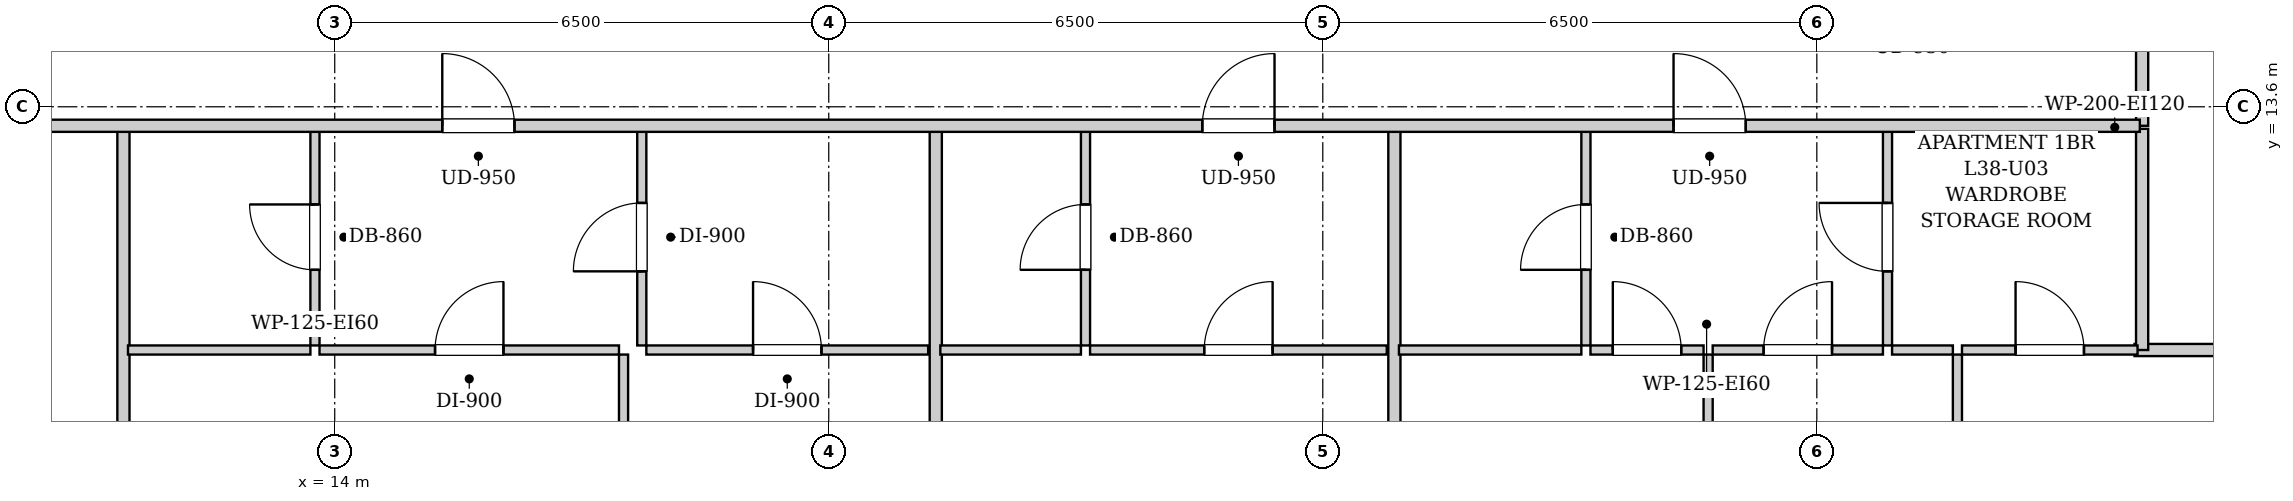
"""IFC4 building model, lengths in metres.
Left out: names, types, materials, properties, quantities, classifications, styles, units other than length and angle.
Written with IfcOpenShell. Run it as: python <this file> out.ifc"""

import sys

from ifc_helpers import new_model, si_unit, direction, frame, frame_2d, origin, place, context, subcontext, project, spatial, rectangle, extrude, element, fill, save


model = new_model("IFC4")
c1 = context("Model", 3, precision=1e-05, world=origin(), true_north=direction((0.0, 1.0)))
c2 = subcontext(c1, "Body", "Model", "MODEL_VIEW")
j1 = project(units=[si_unit("LENGTHUNIT", "METRE"), si_unit("PLANEANGLEUNIT", "RADIAN")], contexts=[c1])
p1 = place(None, origin())
s1 = spatial("IfcSite", under=j1, at=p1, CompositionType="ELEMENT")
p2 = place(p1, origin())
s2 = spatial("IfcBuilding", under=s1, at=p2, CompositionType="ELEMENT")
p3 = place(p2, frame((0.0, 0.0, 134.15)))
s3 = spatial("IfcBuildingStorey", under=s2, at=p3, CompositionType="ELEMENT", Elevation=134.15)
p4 = place(p3, frame((37.78, 13.35, 0.0), z_axis=(0.0, 0.0, 1.0), x_axis=(0.0, 1.0, 0.0)))
e1 = element("IfcWall", 1, at=p4, inside=s3, PredefinedType="PARTITIONING", context=c2, shape_type="SweptSolid", body=[
    extrude(rectangle(XDim=1.74, YDim=0.16, at=frame_2d((0.87, 0.0))), origin(), (0.0, 0.0, 1.0), 2.99),
])
p5 = place(p3, frame((11.22, 4.08, 0.0), z_axis=(0.0, 0.0, 1.0), x_axis=(0.0, 1.0, 0.0)))
e2 = element("IfcWall", 2, at=p5, inside=s3, PredefinedType="PARTITIONING", context=c2, shape_type="SweptSolid", body=[
    extrude(rectangle(XDim=9.23, YDim=0.16, at=frame_2d((4.615, 0.0))), origin(), (0.0, 0.0, 1.0), 2.99),
])
p6 = place(p3, frame((13.74, 10.46, 0.0), z_axis=(0.0, 0.0, 1.0), x_axis=(0.0, 1.0, 0.0)))
e3 = element("IfcWall", 3, at=p6, inside=s3, PredefinedType="PARTITIONING", context=c2, shape_type="SweptSolid", body=[
    extrude(rectangle(XDim=2.85, YDim=0.12, at=frame_2d((1.425, 0.0))), origin(), (0.0, 0.0, 1.0), 2.99),
])
p7 = place(p6, frame((0.995, 0.0, 0.0)))
e4 = element("IfcOpeningElement", 4, at=p7, cuts=e3, PredefinedType="OPENING", context=c2, shape_type="SweptSolid", body=[
    extrude(rectangle(XDim=0.86, YDim=2.05, at=frame_2d((0.43, 1.025))), frame((0.0, 0.07, 0.0), z_axis=(0.0, -1.0, 0.0), x_axis=(1.0, 0.0, 0.0)), (0.0, 0.0, 1.0), 0.14),
])
p8 = place(p3, frame((11.28, 10.4, 0.0), z_axis=(0.0, 0.0, 1.0), x_axis=(1.0, 0.0, 0.0)))
e5 = element("IfcWall", 5, at=p8, inside=s3, PredefinedType="PARTITIONING", context=c2, shape_type="SweptSolid", body=[
    extrude(rectangle(XDim=2.4, YDim=0.12, at=frame_2d((1.2, 0.0))), origin(), (0.0, 0.0, 1.0), 2.99),
])
p9 = place(p3, frame((18.04, 10.46, 0.0), z_axis=(0.0, 0.0, 1.0), x_axis=(0.0, 1.0, 0.0)))
e6 = element("IfcWall", 6, at=p9, inside=s3, PredefinedType="PARTITIONING", context=c2, shape_type="SweptSolid", body=[
    extrude(rectangle(XDim=2.85, YDim=0.12, at=frame_2d((1.425, 0.0))), origin(), (0.0, 0.0, 1.0), 2.99),
])
p10 = place(p9, frame((0.975, 0.0, 0.0)))
e7 = element("IfcOpeningElement", 7, at=p10, cuts=e6, PredefinedType="OPENING", context=c2, shape_type="SweptSolid", body=[
    extrude(rectangle(XDim=0.9, YDim=2.05, at=frame_2d((0.45, 1.025))), frame((0.0, 0.07, 0.0), z_axis=(0.0, -1.0, 0.0), x_axis=(1.0, 0.0, 0.0)), (0.0, 0.0, 1.0), 0.14),
])
p11 = place(p3, frame((13.8, 10.4, 0.0), z_axis=(0.0, 0.0, 1.0), x_axis=(1.0, 0.0, 0.0)))
e8 = element("IfcWall", 8, at=p11, inside=s3, PredefinedType="PARTITIONING", context=c2, shape_type="SweptSolid", body=[
    extrude(rectangle(XDim=3.94, YDim=0.12, at=frame_2d((1.97, 0.0))), origin(), (0.0, 0.0, 1.0), 2.99),
])
p12 = place(p11, frame((1.52, 0.0, 0.0)))
e9 = element("IfcOpeningElement", 9, at=p12, cuts=e8, PredefinedType="OPENING", context=c2, shape_type="SweptSolid", body=[
    extrude(rectangle(XDim=0.9, YDim=2.05, at=frame_2d((0.45, 1.025))), frame((0.0, 0.07, 0.0), z_axis=(0.0, -1.0, 0.0), x_axis=(1.0, 0.0, 0.0)), (0.0, 0.0, 1.0), 0.14),
])
p13 = place(p3, frame((18.1, 10.4, 0.0), z_axis=(0.0, 0.0, 1.0), x_axis=(1.0, 0.0, 0.0)))
e10 = element("IfcWall", 10, at=p13, inside=s3, PredefinedType="PARTITIONING", context=c2, shape_type="SweptSolid", body=[
    extrude(rectangle(XDim=3.708, YDim=0.12, at=frame_2d((1.854, 0.0))), origin(), (0.0, 0.0, 1.0), 2.99),
])
p14 = place(p13, frame((1.404, 0.0, 0.0)))
e11 = element("IfcOpeningElement", 11, at=p14, cuts=e10, PredefinedType="OPENING", context=c2, shape_type="SweptSolid", body=[
    extrude(rectangle(XDim=0.9, YDim=2.05, at=frame_2d((0.45, 1.025))), frame((0.0, 0.07, 0.0), z_axis=(0.0, -1.0, 0.0), x_axis=(1.0, 0.0, 0.0)), (0.0, 0.0, 1.0), 0.14),
])
p15 = place(p3, frame((17.8, 4.08, 0.0), z_axis=(0.0, 0.0, 1.0), x_axis=(0.0, 1.0, 0.0)))
e12 = element("IfcWall", 12, at=p15, inside=s3, PredefinedType="PARTITIONING", context=c2, shape_type="SweptSolid", body=[
    extrude(rectangle(XDim=6.26, YDim=0.12, at=frame_2d((3.13, 0.0))), origin(), (0.0, 0.0, 1.0), 2.426),
])
p16 = place(p15, frame((2.665, 0.0, 0.0)))
e13 = element("IfcOpeningElement", 13, at=p16, cuts=e12, PredefinedType="OPENING", context=c2, shape_type="SweptSolid", body=[
    extrude(rectangle(XDim=0.9, YDim=2.05, at=frame_2d((0.45, 1.025))), frame((0.0, 0.07, 0.0), z_axis=(0.0, -1.0, 0.0), x_axis=(1.0, 0.0, 0.0)), (0.0, 0.0, 1.0), 0.14),
])
p17 = place(p3, frame((21.908, 4.08, 0.0), z_axis=(0.0, 0.0, 1.0), x_axis=(0.0, 1.0, 0.0)))
e14 = element("IfcWall", 14, at=p17, inside=s3, PredefinedType="PARTITIONING", context=c2, shape_type="SweptSolid", body=[
    extrude(rectangle(XDim=9.23, YDim=0.16, at=frame_2d((4.615, 0.0))), origin(), (0.0, 0.0, 1.0), 2.99),
])
p18 = place(p3, frame((23.878, 10.46, 0.0), z_axis=(0.0, 0.0, 1.0), x_axis=(0.0, 1.0, 0.0)))
e15 = element("IfcWall", 15, at=p18, inside=s3, PredefinedType="PARTITIONING", context=c2, shape_type="SweptSolid", body=[
    extrude(rectangle(XDim=2.85, YDim=0.12, at=frame_2d((1.425, 0.0))), origin(), (0.0, 0.0, 1.0), 2.99),
])
p19 = place(p18, frame((0.995, 0.0, 0.0)))
e16 = element("IfcOpeningElement", 16, at=p19, cuts=e15, PredefinedType="OPENING", context=c2, shape_type="SweptSolid", body=[
    extrude(rectangle(XDim=0.86, YDim=2.05, at=frame_2d((0.43, 1.025))), frame((0.0, 0.07, 0.0), z_axis=(0.0, -1.0, 0.0), x_axis=(1.0, 0.0, 0.0)), (0.0, 0.0, 1.0), 0.14),
])
p20 = place(p3, frame((21.968, 10.4, 0.0), z_axis=(0.0, 0.0, 1.0), x_axis=(1.0, 0.0, 0.0)))
e17 = element("IfcWall", 17, at=p20, inside=s3, PredefinedType="PARTITIONING", context=c2, shape_type="SweptSolid", body=[
    extrude(rectangle(XDim=1.85, YDim=0.12, at=frame_2d((0.925, 0.0))), origin(), (0.0, 0.0, 1.0), 2.99),
])
p21 = place(p3, frame((23.938, 10.4, 0.0), z_axis=(0.0, 0.0, 1.0), x_axis=(1.0, 0.0, 0.0)))
e18 = element("IfcWall", 18, at=p21, inside=s3, PredefinedType="PARTITIONING", context=c2, shape_type="SweptSolid", body=[
    extrude(rectangle(XDim=3.904, YDim=0.12, at=frame_2d((1.952, 0.0))), origin(), (0.0, 0.0, 1.0), 2.99),
])
p22 = place(p21, frame((1.502, 0.0, 0.0)))
e19 = element("IfcOpeningElement", 19, at=p22, cuts=e18, PredefinedType="OPENING", context=c2, shape_type="SweptSolid", body=[
    extrude(rectangle(XDim=0.9, YDim=2.05, at=frame_2d((0.45, 1.025))), frame((0.0, 0.07, 0.0), z_axis=(0.0, -1.0, 0.0), x_axis=(1.0, 0.0, 0.0)), (0.0, 0.0, 1.0), 0.14),
])
p23 = place(p3, frame((37.68, 10.4, 0.0), z_axis=(0.0, 0.0, 1.0), x_axis=(1.0, 0.0, 0.0)))
e20 = element("IfcWall", 20, at=p23, inside=s3, PredefinedType="PARTITIONING", context=c2, shape_type="SweptSolid", body=[
    extrude(rectangle(XDim=2.34, YDim=0.16, at=frame_2d((1.17, 0.0))), origin(), (0.0, 0.0, 1.0), 2.99),
])
p24 = place(p3, frame((37.78, 10.4, 0.0), z_axis=(0.0, 0.0, 1.0), x_axis=(0.0, 1.0, 0.0)))
e21 = element("IfcWall", 21, at=p24, inside=s3, PredefinedType="PARTITIONING", context=c2, shape_type="SweptSolid", body=[
    extrude(rectangle(XDim=2.91, YDim=0.16, at=frame_2d((1.455, 0.0))), origin(), (0.0, 0.0, 1.0), 2.99),
])
p25 = place(p3, frame((27.942, 4.08, 0.0), z_axis=(0.0, 0.0, 1.0), x_axis=(0.0, 1.0, 0.0)))
e22 = element("IfcWall", 22, at=p25, inside=s3, PredefinedType="PARTITIONING", context=c2, shape_type="SweptSolid", body=[
    extrude(rectangle(XDim=9.23, YDim=0.16, at=frame_2d((4.615, 0.0))), origin(), (0.0, 0.0, 1.0), 2.99),
])
p26 = place(p3, frame((30.462, 10.46, 0.0), z_axis=(0.0, 0.0, 1.0), x_axis=(0.0, 1.0, 0.0)))
e23 = element("IfcWall", 23, at=p26, inside=s3, PredefinedType="PARTITIONING", context=c2, shape_type="SweptSolid", body=[
    extrude(rectangle(XDim=2.85, YDim=0.12, at=frame_2d((1.425, 0.0))), origin(), (0.0, 0.0, 1.0), 2.99),
])
p27 = place(p26, frame((0.995, 0.0, 0.0)))
e24 = element("IfcOpeningElement", 24, at=p27, cuts=e23, PredefinedType="OPENING", context=c2, shape_type="SweptSolid", body=[
    extrude(rectangle(XDim=0.86, YDim=2.05, at=frame_2d((0.43, 1.025))), frame((0.0, 0.07, 0.0), z_axis=(0.0, -1.0, 0.0), x_axis=(1.0, 0.0, 0.0)), (0.0, 0.0, 1.0), 0.14),
])
p28 = place(p3, frame((28.002, 10.4, 0.0), z_axis=(0.0, 0.0, 1.0), x_axis=(1.0, 0.0, 0.0)))
e25 = element("IfcWall", 25, at=p28, inside=s3, PredefinedType="PARTITIONING", context=c2, shape_type="SweptSolid", body=[
    extrude(rectangle(XDim=2.4, YDim=0.12, at=frame_2d((1.2, 0.0))), origin(), (0.0, 0.0, 1.0), 2.99),
])
p29 = place(p3, frame((34.43, 10.46, 0.0), z_axis=(0.0, 0.0, 1.0), x_axis=(0.0, 1.0, 0.0)))
e26 = element("IfcWall", 26, at=p29, inside=s3, PredefinedType="PARTITIONING", context=c2, shape_type="SweptSolid", body=[
    extrude(rectangle(XDim=2.85, YDim=0.12, at=frame_2d((1.425, 0.0))), origin(), (0.0, 0.0, 1.0), 2.99),
])
p30 = place(p29, frame((0.975, 0.0, 0.0)))
e27 = element("IfcOpeningElement", 27, at=p30, cuts=e26, PredefinedType="OPENING", context=c2, shape_type="SweptSolid", body=[
    extrude(rectangle(XDim=0.9, YDim=2.05, at=frame_2d((0.45, 1.025))), frame((0.0, 0.07, 0.0), z_axis=(0.0, -1.0, 0.0), x_axis=(1.0, 0.0, 0.0)), (0.0, 0.0, 1.0), 0.14),
])
p31 = place(p3, frame((30.522, 10.4, 0.0), z_axis=(0.0, 0.0, 1.0), x_axis=(1.0, 0.0, 0.0)))
e28 = element("IfcWall", 28, at=p31, inside=s3, PredefinedType="PARTITIONING", context=c2, shape_type="SweptSolid", body=[
    extrude(rectangle(XDim=1.488, YDim=0.12, at=frame_2d((0.744, 0.0))), origin(), (0.0, 0.0, 1.0), 2.99),
])
p32 = place(p31, frame((0.294, 0.0, 0.0)))
e29 = element("IfcOpeningElement", 29, at=p32, cuts=e28, PredefinedType="OPENING", context=c2, shape_type="SweptSolid", body=[
    extrude(rectangle(XDim=0.9, YDim=2.05, at=frame_2d((0.45, 1.025))), frame((0.0, 0.07, 0.0), z_axis=(0.0, -1.0, 0.0), x_axis=(1.0, 0.0, 0.0)), (0.0, 0.0, 1.0), 0.14),
])
p33 = place(p3, frame((32.13, 10.4, 0.0), z_axis=(0.0, 0.0, 1.0), x_axis=(1.0, 0.0, 0.0)))
e30 = element("IfcWall", 30, at=p33, inside=s3, PredefinedType="PARTITIONING", context=c2, shape_type="SweptSolid", body=[
    extrude(rectangle(XDim=2.24, YDim=0.12, at=frame_2d((1.12, 0.0))), origin(), (0.0, 0.0, 1.0), 2.99),
])
p34 = place(p33, frame((0.67, 0.0, 0.0)))
e31 = element("IfcOpeningElement", 31, at=p34, cuts=e30, PredefinedType="OPENING", context=c2, shape_type="SweptSolid", body=[
    extrude(rectangle(XDim=0.9, YDim=2.05, at=frame_2d((0.45, 1.025))), frame((0.0, 0.07, 0.0), z_axis=(0.0, -1.0, 0.0), x_axis=(1.0, 0.0, 0.0)), (0.0, 0.0, 1.0), 0.14),
])
p35 = place(p3, frame((34.49, 10.4, 0.0), z_axis=(0.0, 0.0, 1.0), x_axis=(1.0, 0.0, 0.0)))
e32 = element("IfcWall", 32, at=p35, inside=s3, PredefinedType="PARTITIONING", context=c2, shape_type="SweptSolid", body=[
    extrude(rectangle(XDim=0.8, YDim=0.12, at=frame_2d((0.4, 0.0))), origin(), (0.0, 0.0, 1.0), 2.99),
])
p36 = place(p3, frame((35.41, 10.4, 0.0), z_axis=(0.0, 0.0, 1.0), x_axis=(1.0, 0.0, 0.0)))
e33 = element("IfcWall", 33, at=p36, inside=s3, PredefinedType="PARTITIONING", context=c2, shape_type="SweptSolid", body=[
    extrude(rectangle(XDim=2.31, YDim=0.12, at=frame_2d((1.155, 0.0))), origin(), (0.0, 0.0, 1.0), 2.99),
])
p37 = place(p36, frame((0.705, 0.0, 0.0)))
e34 = element("IfcOpeningElement", 34, at=p37, cuts=e33, PredefinedType="OPENING", context=c2, shape_type="SweptSolid", body=[
    extrude(rectangle(XDim=0.9, YDim=2.05, at=frame_2d((0.45, 1.025))), frame((0.0, 0.07, 0.0), z_axis=(0.0, -1.0, 0.0), x_axis=(1.0, 0.0, 0.0)), (0.0, 0.0, 1.0), 0.14),
])
p38 = place(p3, frame((32.07, 4.08, 0.0), z_axis=(0.0, 0.0, 1.0), x_axis=(0.0, 1.0, 0.0)))
e35 = element("IfcWall", 35, at=p38, inside=s3, PredefinedType="PARTITIONING", context=c2, shape_type="SweptSolid", body=[
    extrude(rectangle(XDim=6.26, YDim=0.12, at=frame_2d((3.13, 0.0))), origin(), (0.0, 0.0, 1.0), 2.99),
])
p39 = place(p38, frame((2.665, 0.0, 0.0)))
e36 = element("IfcOpeningElement", 36, at=p39, cuts=e35, PredefinedType="OPENING", context=c2, shape_type="SweptSolid", body=[
    extrude(rectangle(XDim=0.9, YDim=2.05, at=frame_2d((0.45, 1.025))), frame((0.0, 0.07, 0.0), z_axis=(0.0, -1.0, 0.0), x_axis=(1.0, 0.0, 0.0)), (0.0, 0.0, 1.0), 0.14),
])
p40 = place(p3, frame((35.35, 4.08, 0.0), z_axis=(0.0, 0.0, 1.0), x_axis=(0.0, 1.0, 0.0)))
e37 = element("IfcWall", 37, at=p40, inside=s3, PredefinedType="PARTITIONING", context=c2, shape_type="SweptSolid", body=[
    extrude(rectangle(XDim=6.26, YDim=0.12, at=frame_2d((3.13, 0.0))), origin(), (0.0, 0.0, 1.0), 2.99),
])
p41 = place(p40, frame((2.665, 0.0, 0.0)))
e38 = element("IfcOpeningElement", 38, at=p41, cuts=e37, PredefinedType="OPENING", context=c2, shape_type="SweptSolid", body=[
    extrude(rectangle(XDim=0.9, YDim=2.05, at=frame_2d((0.45, 1.025))), frame((0.0, 0.07, 0.0), z_axis=(0.0, -1.0, 0.0), x_axis=(1.0, 0.0, 0.0)), (0.0, 0.0, 1.0), 0.14),
])
p42 = place(p3, frame((10.05, 13.35, 0.0), z_axis=(0.0, 0.0, 1.0), x_axis=(1.0, 0.0, 0.0)))
e39 = element("IfcWall", 39, at=p42, inside=s3, PredefinedType="PARTITIONING", context=c2, shape_type="SweptSolid", body=[
    extrude(rectangle(XDim=27.7, YDim=0.16, at=frame_2d((13.85, 0.0))), origin(), (0.0, 0.0, 1.0), 2.99),
])
p43 = place(p42, frame((5.365, 0.0, 0.0)))
e40 = element("IfcOpeningElement", 40, at=p43, cuts=e39, PredefinedType="OPENING", context=c2, shape_type="SweptSolid", body=[
    extrude(rectangle(XDim=0.95, YDim=2.1, at=frame_2d((0.475, 1.05))), frame((0.0, 0.09, 0.0), z_axis=(0.0, -1.0, 0.0), x_axis=(1.0, 0.0, 0.0)), (0.0, 0.0, 1.0), 0.18),
])
p44 = place(p42, frame((15.365, 0.0, 0.0)))
e41 = element("IfcOpeningElement", 41, at=p44, cuts=e39, PredefinedType="OPENING", context=c2, shape_type="SweptSolid", body=[
    extrude(rectangle(XDim=0.95, YDim=2.1, at=frame_2d((0.475, 1.05))), frame((0.0, 0.09, 0.0), z_axis=(0.0, -1.0, 0.0), x_axis=(1.0, 0.0, 0.0)), (0.0, 0.0, 1.0), 0.18),
])
p45 = place(p42, frame((21.565, 0.0, 0.0)))
e42 = element("IfcOpeningElement", 42, at=p45, cuts=e39, PredefinedType="OPENING", context=c2, shape_type="SweptSolid", body=[
    extrude(rectangle(XDim=0.95, YDim=2.1, at=frame_2d((0.475, 1.05))), frame((0.0, 0.09, 0.0), z_axis=(0.0, -1.0, 0.0), x_axis=(1.0, 0.0, 0.0)), (0.0, 0.0, 1.0), 0.18),
])
p46 = place(p7, origin())
e43 = element("IfcDoor", 43, at=p46, inside=s3, OperationType="SINGLE_SWING_RIGHT", PredefinedType="DOOR", context=c2, shape_type="SweptSolid", body=[
    extrude(rectangle(XDim=0.86, YDim=2.05, at=frame_2d((0.43, 1.025))), frame((0.0, 0.025, 0.0), z_axis=(0.0, -1.0, 0.0), x_axis=(1.0, 0.0, 0.0)), (0.0, 0.0, 1.0), 0.05),
])
fill(e4, e43)
p47 = place(p10, origin())
e44 = element("IfcDoor", 44, at=p47, inside=s3, OperationType="SINGLE_SWING_LEFT", PredefinedType="DOOR", context=c2, shape_type="SweptSolid", body=[
    extrude(rectangle(XDim=0.9, YDim=2.05, at=frame_2d((0.45, 1.025))), frame((0.0, 0.025, 0.0), z_axis=(0.0, -1.0, 0.0), x_axis=(1.0, 0.0, 0.0)), (0.0, 0.0, 1.0), 0.05),
])
fill(e7, e44)
p48 = place(p12, origin())
e45 = element("IfcDoor", 45, at=p48, inside=s3, OperationType="SINGLE_SWING_RIGHT", PredefinedType="DOOR", context=c2, shape_type="SweptSolid", body=[
    extrude(rectangle(XDim=0.9, YDim=2.05, at=frame_2d((0.45, 1.025))), frame((0.0, 0.025, 0.0), z_axis=(0.0, -1.0, 0.0), x_axis=(1.0, 0.0, 0.0)), (0.0, 0.0, 1.0), 0.05),
])
fill(e9, e45)
p49 = place(p14, origin())
e46 = element("IfcDoor", 46, at=p49, inside=s3, OperationType="SINGLE_SWING_LEFT", PredefinedType="DOOR", context=c2, shape_type="SweptSolid", body=[
    extrude(rectangle(XDim=0.9, YDim=2.05, at=frame_2d((0.45, 1.025))), frame((0.0, 0.025, 0.0), z_axis=(0.0, -1.0, 0.0), x_axis=(1.0, 0.0, 0.0)), (0.0, 0.0, 1.0), 0.05),
])
fill(e11, e46)
p50 = place(p19, origin())
e47 = element("IfcDoor", 47, at=p50, inside=s3, OperationType="SINGLE_SWING_LEFT", PredefinedType="DOOR", context=c2, shape_type="SweptSolid", body=[
    extrude(rectangle(XDim=0.86, YDim=2.05, at=frame_2d((0.43, 1.025))), frame((0.0, 0.025, 0.0), z_axis=(0.0, -1.0, 0.0), x_axis=(1.0, 0.0, 0.0)), (0.0, 0.0, 1.0), 0.05),
])
fill(e16, e47)
p51 = place(p22, origin())
e48 = element("IfcDoor", 48, at=p51, inside=s3, OperationType="SINGLE_SWING_RIGHT", PredefinedType="DOOR", context=c2, shape_type="SweptSolid", body=[
    extrude(rectangle(XDim=0.9, YDim=2.05, at=frame_2d((0.45, 1.025))), frame((0.0, 0.025, 0.0), z_axis=(0.0, -1.0, 0.0), x_axis=(1.0, 0.0, 0.0)), (0.0, 0.0, 1.0), 0.05),
])
fill(e19, e48)
p52 = place(p27, origin())
e49 = element("IfcDoor", 49, at=p52, inside=s3, OperationType="SINGLE_SWING_LEFT", PredefinedType="DOOR", context=c2, shape_type="SweptSolid", body=[
    extrude(rectangle(XDim=0.86, YDim=2.05, at=frame_2d((0.43, 1.025))), frame((0.0, 0.025, 0.0), z_axis=(0.0, -1.0, 0.0), x_axis=(1.0, 0.0, 0.0)), (0.0, 0.0, 1.0), 0.05),
])
fill(e24, e49)
p53 = place(p30, origin())
e50 = element("IfcDoor", 50, at=p53, inside=s3, OperationType="SINGLE_SWING_RIGHT", PredefinedType="DOOR", context=c2, shape_type="SweptSolid", body=[
    extrude(rectangle(XDim=0.9, YDim=2.05, at=frame_2d((0.45, 1.025))), frame((0.0, 0.025, 0.0), z_axis=(0.0, -1.0, 0.0), x_axis=(1.0, 0.0, 0.0)), (0.0, 0.0, 1.0), 0.05),
])
fill(e27, e50)
p54 = place(p32, origin())
e51 = element("IfcDoor", 51, at=p54, inside=s3, OperationType="SINGLE_SWING_LEFT", PredefinedType="DOOR", context=c2, shape_type="SweptSolid", body=[
    extrude(rectangle(XDim=0.9, YDim=2.05, at=frame_2d((0.45, 1.025))), frame((0.0, 0.025, 0.0), z_axis=(0.0, -1.0, 0.0), x_axis=(1.0, 0.0, 0.0)), (0.0, 0.0, 1.0), 0.05),
])
fill(e29, e51)
p55 = place(p34, origin())
e52 = element("IfcDoor", 52, at=p55, inside=s3, OperationType="SINGLE_SWING_RIGHT", PredefinedType="DOOR", context=c2, shape_type="SweptSolid", body=[
    extrude(rectangle(XDim=0.9, YDim=2.05, at=frame_2d((0.45, 1.025))), frame((0.0, 0.025, 0.0), z_axis=(0.0, -1.0, 0.0), x_axis=(1.0, 0.0, 0.0)), (0.0, 0.0, 1.0), 0.05),
])
fill(e31, e52)
p56 = place(p37, origin())
e53 = element("IfcDoor", 53, at=p56, inside=s3, OperationType="SINGLE_SWING_LEFT", PredefinedType="DOOR", context=c2, shape_type="SweptSolid", body=[
    extrude(rectangle(XDim=0.9, YDim=2.05, at=frame_2d((0.45, 1.025))), frame((0.0, 0.025, 0.0), z_axis=(0.0, -1.0, 0.0), x_axis=(1.0, 0.0, 0.0)), (0.0, 0.0, 1.0), 0.05),
])
fill(e34, e53)
p57 = place(p43, origin())
e54 = element("IfcDoor", 54, at=p57, inside=s3, OperationType="SINGLE_SWING_LEFT", PredefinedType="DOOR", context=c2, shape_type="SweptSolid", body=[
    extrude(rectangle(XDim=0.95, YDim=2.1, at=frame_2d((0.475, 1.05))), frame((0.0, 0.025, 0.0), z_axis=(0.0, -1.0, 0.0), x_axis=(1.0, 0.0, 0.0)), (0.0, 0.0, 1.0), 0.05),
])
fill(e40, e54)
p58 = place(p44, origin())
e55 = element("IfcDoor", 55, at=p58, inside=s3, OperationType="SINGLE_SWING_RIGHT", PredefinedType="DOOR", context=c2, shape_type="SweptSolid", body=[
    extrude(rectangle(XDim=0.95, YDim=2.1, at=frame_2d((0.475, 1.05))), frame((0.0, 0.025, 0.0), z_axis=(0.0, -1.0, 0.0), x_axis=(1.0, 0.0, 0.0)), (0.0, 0.0, 1.0), 0.05),
])
fill(e41, e55)
p59 = place(p45, origin())
e56 = element("IfcDoor", 56, at=p59, inside=s3, OperationType="SINGLE_SWING_LEFT", PredefinedType="DOOR", context=c2, shape_type="SweptSolid", body=[
    extrude(rectangle(XDim=0.95, YDim=2.1, at=frame_2d((0.475, 1.05))), frame((0.0, 0.025, 0.0), z_axis=(0.0, -1.0, 0.0), x_axis=(1.0, 0.0, 0.0)), (0.0, 0.0, 1.0), 0.05),
])
fill(e42, e56)
save(model, sys.argv[1])
